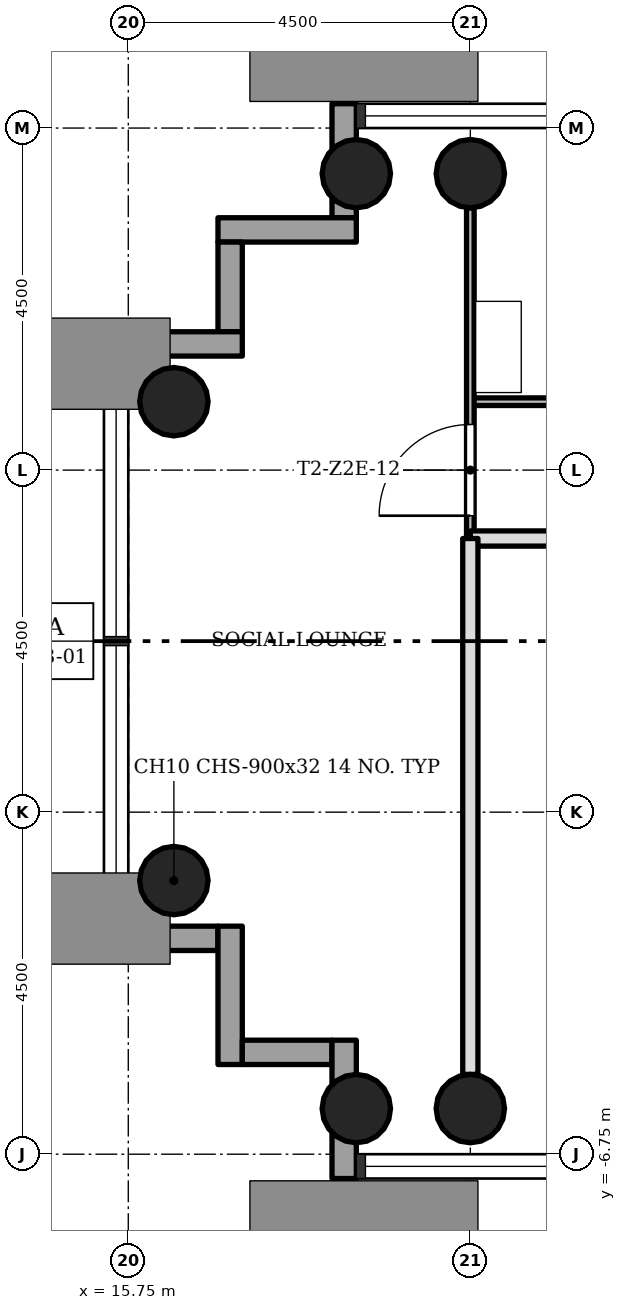
"""IFC4 building model, lengths in metres.
Left out: names, types, materials, properties, quantities, classifications, styles, units other than length and angle.
Written with IfcOpenShell. Run it as: python <this file> out.ifc"""

import sys

from ifc_helpers import new_model, si_unit, direction, frame, frame_2d, origin, origin_2d, place, context, subcontext, project, spatial, rectangle, hollow_circle, extrude, element, fill, save


model = new_model("IFC4")
c1 = context("Model", 3, precision=1e-05, world=origin(), true_north=direction((0.0, 1.0)))
c2 = subcontext(c1, "Body", "Model", "MODEL_VIEW")
j1 = project(units=[si_unit("LENGTHUNIT", "METRE"), si_unit("PLANEANGLEUNIT", "RADIAN")], contexts=[c1])
p1 = place(None, origin())
s1 = spatial("IfcSite", under=j1, at=p1, CompositionType="ELEMENT")
p2 = place(p1, origin())
s2 = spatial("IfcBuilding", under=s1, at=p2, CompositionType="ELEMENT")
p3 = place(p2, frame((0.0, 0.0, 100.4)))
s3 = spatial("IfcBuildingStorey", under=s2, at=p3, CompositionType="ELEMENT", Elevation=100.4)
for number, where, z_axis, x_axis in (
    (1, (20.25, 6.15, 0.0), (0.0, 0.0, 1.0), (1.0, 0.0, 0.0)),
    (2, (20.25, -6.15, 0.0), (0.0, 0.0, 1.0), (1.0, 0.0, 0.0)),
    (3, (18.75, 6.15, 0.0), (0.0, 0.0, 1.0), (1.0, 0.0, 0.0)),
    (4, (18.75, -6.15, 0.0), (0.0, 0.0, 1.0), (1.0, 0.0, 0.0)),
    (5, (16.35, 3.15, 0.0), (0.0, 0.0, 1.0), (1.0, 0.0, 0.0)),
    (6, (16.35, -3.15, 0.0), (0.0, 0.0, 1.0), (1.0, 0.0, 0.0)),
):
    element("IfcColumn", number, at=place(p3, frame(where, z_axis=z_axis, x_axis=x_axis)), inside=s3, PredefinedType="COLUMN", context=c2, shape_type="SweptSolid", body=[
        extrude(hollow_circle(Radius=0.45, WallThickness=0.032, at=origin_2d()), origin(), (0.0, 0.0, 1.0), 3.4),
    ])
p4 = place(p3, frame((18.59, 7.07, -0.3), z_axis=(0.0, 0.0, 1.0), x_axis=(0.0, -1.0, 0.0)))
e7 = element("IfcWall", 7, at=p4, inside=s3, PredefinedType="STANDARD", context=c2, shape_type="SweptSolid", body=[
    extrude(rectangle(XDim=1.5, YDim=0.32, at=frame_2d((0.75, 0.0))), origin(), (0.0, 0.0, 1.0), 3.4),
])
p5 = place(p3, frame((18.75, 5.41, -0.3), z_axis=(0.0, 0.0, 1.0), x_axis=(-1.0, 0.0, 0.0)))
e8 = element("IfcWall", 8, at=p5, inside=s3, PredefinedType="STANDARD", context=c2, shape_type="SweptSolid", body=[
    extrude(rectangle(XDim=1.82, YDim=0.32, at=frame_2d((0.91, 0.0))), origin(), (0.0, 0.0, 1.0), 3.4),
])
p6 = place(p3, frame((17.09, 5.25, -0.3), z_axis=(0.0, 0.0, 1.0), x_axis=(0.0, -1.0, 0.0)))
e9 = element("IfcWall", 9, at=p6, inside=s3, PredefinedType="STANDARD", context=c2, shape_type="SweptSolid", body=[
    extrude(rectangle(XDim=1.18, YDim=0.32, at=frame_2d((0.59, 0.0))), origin(), (0.0, 0.0, 1.0), 3.4),
])
p7 = place(p3, frame((17.25, 3.91, -0.3), z_axis=(0.0, 0.0, 1.0), x_axis=(-1.0, 0.0, 0.0)))
e10 = element("IfcWall", 10, at=p7, inside=s3, PredefinedType="STANDARD", context=c2, shape_type="SweptSolid", body=[
    extrude(rectangle(XDim=1.82, YDim=0.32, at=frame_2d((0.91, 0.0))), origin(), (0.0, 0.0, 1.0), 3.4),
])
p8 = place(p3, frame((15.43, -3.91, -0.3), z_axis=(0.0, 0.0, 1.0), x_axis=(1.0, 0.0, 0.0)))
e11 = element("IfcWall", 11, at=p8, inside=s3, PredefinedType="STANDARD", context=c2, shape_type="SweptSolid", body=[
    extrude(rectangle(XDim=1.5, YDim=0.32, at=frame_2d((0.75, 0.0))), origin(), (0.0, 0.0, 1.0), 3.4),
])
p9 = place(p3, frame((17.09, -3.75, -0.3), z_axis=(0.0, 0.0, 1.0), x_axis=(0.0, -1.0, 0.0)))
e12 = element("IfcWall", 12, at=p9, inside=s3, PredefinedType="STANDARD", context=c2, shape_type="SweptSolid", body=[
    extrude(rectangle(XDim=1.82, YDim=0.32, at=frame_2d((0.91, 0.0))), origin(), (0.0, 0.0, 1.0), 3.4),
])
p10 = place(p3, frame((17.25, -5.41, -0.3), z_axis=(0.0, 0.0, 1.0), x_axis=(1.0, 0.0, 0.0)))
e13 = element("IfcWall", 13, at=p10, inside=s3, PredefinedType="STANDARD", context=c2, shape_type="SweptSolid", body=[
    extrude(rectangle(XDim=1.18, YDim=0.32, at=frame_2d((0.59, 0.0))), origin(), (0.0, 0.0, 1.0), 3.4),
])
p11 = place(p3, frame((18.59, -5.25, -0.3), z_axis=(0.0, 0.0, 1.0), x_axis=(0.0, -1.0, 0.0)))
e14 = element("IfcWall", 14, at=p11, inside=s3, PredefinedType="STANDARD", context=c2, shape_type="SweptSolid", body=[
    extrude(rectangle(XDim=1.82, YDim=0.32, at=frame_2d((0.91, 0.0))), origin(), (0.0, 0.0, 1.0), 3.4),
])
p12 = place(p3, frame((27.45, 1.35, 0.0), z_axis=(0.0, 0.0, 1.0), x_axis=(-1.0, 0.0, 0.0)))
e15 = element("IfcWall", 15, at=p12, inside=s3, PredefinedType="SOLIDWALL", context=c2, shape_type="SweptSolid", body=[
    extrude(rectangle(XDim=7.2, YDim=0.2, at=frame_2d((3.6, 0.0))), origin(), (0.0, 0.0, 1.0), 3.0),
])
p13 = place(p12, frame((4.35, 0.0, 0.0)))
e16 = element("IfcOpeningElement", 16, at=p13, cuts=e15, PredefinedType="OPENING", context=c2, shape_type="SweptSolid", body=[
    extrude(rectangle(XDim=0.9, YDim=2.1, at=frame_2d((0.45, 1.05))), frame((0.0, 0.11, 0.0), z_axis=(0.0, -1.0, 0.0), x_axis=(1.0, 0.0, 0.0)), (0.0, 0.0, 1.0), 0.22),
])
p14 = place(p3, frame((29.25, 3.15, 0.0), z_axis=(0.0, 0.0, 1.0), x_axis=(-1.0, 0.0, 0.0)))
e17 = element("IfcWall", 17, at=p14, inside=s3, PredefinedType="PARTITIONING", context=c2, shape_type="SweptSolid", body=[
    extrude(rectangle(XDim=9.0, YDim=0.1, at=frame_2d((4.5, 0.0))), origin(), (0.0, 0.0, 1.0), 3.0),
])
p15 = place(p14, frame((2.55, 0.0, 0.0)))
e18 = element("IfcOpeningElement", 18, at=p15, cuts=e17, PredefinedType="OPENING", context=c2, shape_type="SweptSolid", body=[
    extrude(rectangle(XDim=0.9, YDim=2.1, at=frame_2d((0.45, 1.05))), frame((0.0, 0.06, 0.0), z_axis=(0.0, -1.0, 0.0), x_axis=(1.0, 0.0, 0.0)), (0.0, 0.0, 1.0), 0.12),
])
p16 = place(p3, frame((20.25, 1.35, 0.0), z_axis=(0.0, 0.0, 1.0), x_axis=(0.0, 1.0, 0.0)))
e19 = element("IfcWall", 19, at=p16, inside=s3, PredefinedType="PARTITIONING", context=c2, shape_type="SweptSolid", body=[
    extrude(rectangle(XDim=4.35, YDim=0.1, at=frame_2d((2.175, 0.0))), origin(), (0.0, 0.0, 1.0), 3.0),
])
p17 = place(p16, frame((0.3, 0.0, 0.0)))
e20 = element("IfcOpeningElement", 20, at=p17, cuts=e19, PredefinedType="OPENING", context=c2, shape_type="SweptSolid", body=[
    extrude(rectangle(XDim=1.2, YDim=2.1, at=frame_2d((0.6, 1.05))), frame((0.0, 0.06, 0.0), z_axis=(0.0, -1.0, 0.0), x_axis=(1.0, 0.0, 0.0)), (0.0, 0.0, 1.0), 0.12),
])
p18 = place(p3, frame((20.25, -5.7, 0.0), z_axis=(0.0, 0.0, 1.0), x_axis=(0.0, 1.0, 0.0)))
e21 = element("IfcWall", 21, at=p18, inside=s3, PredefinedType="SOLIDWALL", context=c2, shape_type="SweptSolid", body=[
    extrude(rectangle(XDim=7.05, YDim=0.2, at=frame_2d((3.525, 0.0))), origin(), (0.0, 0.0, 1.0), 3.0),
])
p19 = place(p17, origin())
e22 = element("IfcDoor", 22, at=p19, inside=s3, OperationType="SINGLE_SWING_RIGHT", PredefinedType="DOOR", context=c2, shape_type="SweptSolid", body=[
    extrude(rectangle(XDim=1.2, YDim=2.1, at=frame_2d((0.6, 1.05))), frame((0.0, 0.025, 0.0), z_axis=(0.0, -1.0, 0.0), x_axis=(1.0, 0.0, 0.0)), (0.0, 0.0, 1.0), 0.05),
])
fill(e20, e22)
save(model, sys.argv[1])
